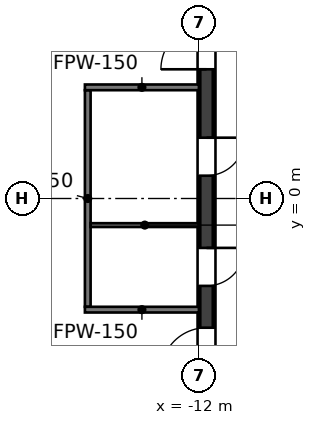
"""IFC4 building model, lengths in metres.
Left out: names, types, materials, properties, quantities, classifications, styles, units other than length and angle.
Written with IfcOpenShell. Run it as: python <this file> out.ifc"""

import sys

from ifc_helpers import new_model, si_unit, direction, frame, frame_2d, origin, place, context, subcontext, project, spatial, rectangle, extrude, element, fill, save


model = new_model("IFC4")
c1 = context("Model", 3, precision=1e-05, world=origin(), true_north=direction((0.0, 1.0)))
c2 = subcontext(c1, "Body", "Model", "MODEL_VIEW")
j1 = project(units=[si_unit("LENGTHUNIT", "METRE"), si_unit("PLANEANGLEUNIT", "RADIAN")], contexts=[c1])
p1 = place(None, origin())
s1 = spatial("IfcSite", under=j1, at=p1, CompositionType="ELEMENT")
p2 = place(p1, origin())
s2 = spatial("IfcBuilding", under=s1, at=p2, CompositionType="ELEMENT")
p3 = place(p2, frame((0.0, 0.0, 225.6)))
s3 = spatial("IfcBuildingStorey", under=s2, at=p3, CompositionType="ELEMENT", Elevation=225.6)
p4 = place(p3, frame((-11.8, -5.5, 0.0), z_axis=(0.0, 0.0, 1.0), x_axis=(0.0, 1.0, 0.0)))
e1 = element("IfcWall", 1, at=p4, inside=s3, PredefinedType="SHEAR", context=c2, shape_type="SweptSolid", body=[
    extrude(rectangle(XDim=11.0, YDim=0.4, at=frame_2d((5.5, 0.0))), origin(), (0.0, 0.0, 1.0), 4.0),
])
p5 = place(p4, frame((3.2, 0.0, 0.0)))
e2 = element("IfcOpeningElement", 2, at=p5, cuts=e1, PredefinedType="OPENING", context=c2, shape_type="SweptSolid", body=[
    extrude(rectangle(XDim=1.0, YDim=2.1, at=frame_2d((0.5, 1.05))), frame((0.0, 0.2, 0.0), z_axis=(0.0, -1.0, 0.0), x_axis=(1.0, 0.0, 0.0)), (0.0, 0.0, 1.0), 0.4),
])
p6 = place(p4, frame((6.1, 0.0, 0.0)))
e3 = element("IfcOpeningElement", 3, at=p6, cuts=e1, PredefinedType="OPENING", context=c2, shape_type="SweptSolid", body=[
    extrude(rectangle(XDim=1.0, YDim=2.1, at=frame_2d((0.5, 1.05))), frame((0.0, 0.2, 0.0), z_axis=(0.0, -1.0, 0.0), x_axis=(1.0, 0.0, 0.0)), (0.0, 0.0, 1.0), 0.4),
])
p7 = place(p4, frame((0.9, 0.0, 0.0)))
e4 = element("IfcOpeningElement", 4, at=p7, cuts=e1, PredefinedType="OPENING", context=c2, shape_type="SweptSolid", body=[
    extrude(rectangle(XDim=1.2, YDim=2.1, at=frame_2d((0.6, 1.05))), frame((0.0, 0.2, 0.0), z_axis=(0.0, -1.0, 0.0), x_axis=(1.0, 0.0, 0.0)), (0.0, 0.0, 1.0), 0.4),
])
p8 = place(p4, frame((8.9, 0.0, 0.0)))
e5 = element("IfcOpeningElement", 5, at=p8, cuts=e1, PredefinedType="OPENING", context=c2, shape_type="SweptSolid", body=[
    extrude(rectangle(XDim=1.2, YDim=2.1, at=frame_2d((0.6, 1.05))), frame((0.0, 0.2, 0.0), z_axis=(0.0, -1.0, 0.0), x_axis=(1.0, 0.0, 0.0)), (0.0, 0.0, 1.0), 0.4),
])
p9 = place(p3, frame((-14.925, -2.85, 0.0), z_axis=(0.0, 0.0, 1.0), x_axis=(0.0, 1.0, 0.0)))
e6 = element("IfcWall", 6, at=p9, inside=s3, PredefinedType="PARTITIONING", context=c2, shape_type="SweptSolid", body=[
    extrude(rectangle(XDim=5.7, YDim=0.15, at=frame_2d((2.85, 0.0))), origin(), (0.0, 0.0, 1.0), 2.918),
])
for number, where, z_axis, x_axis in (
    (7, (-15.0, 2.925, 0.0), (0.0, 0.0, 1.0), (1.0, 0.0, 0.0)),
    (8, (-15.0, -2.925, 0.0), (0.0, 0.0, 1.0), (1.0, 0.0, 0.0)),
):
    element("IfcWall", number, at=place(p3, frame(where, z_axis=z_axis, x_axis=x_axis)), inside=s3, PredefinedType="PARTITIONING", context=c2, shape_type="SweptSolid", body=[
        extrude(rectangle(XDim=3.0, YDim=0.15, at=frame_2d((1.5, 0.0))), origin(), (0.0, 0.0, 1.0), 2.918),
    ])
p10 = place(p3, frame((-14.85, -0.7, 0.0), z_axis=(0.0, 0.0, 1.0), x_axis=(1.0, 0.0, 0.0)))
e9 = element("IfcWall", 9, at=p10, inside=s3, PredefinedType="PARTITIONING", context=c2, shape_type="SweptSolid", body=[
    extrude(rectangle(XDim=2.85, YDim=0.1, at=frame_2d((1.425, 0.0))), origin(), (0.0, 0.0, 1.0), 2.918),
])
p11 = place(p5, origin())
e10 = element("IfcDoor", 10, at=p11, inside=s3, OperationType="SINGLE_SWING_RIGHT", PredefinedType="DOOR", context=c2, shape_type="SweptSolid", body=[
    extrude(rectangle(XDim=1.0, YDim=2.1, at=frame_2d((0.5, 1.05))), frame((0.0, 0.025, 0.0), z_axis=(0.0, -1.0, 0.0), x_axis=(1.0, 0.0, 0.0)), (0.0, 0.0, 1.0), 0.05),
])
fill(e2, e10)
p12 = place(p6, origin())
e11 = element("IfcDoor", 11, at=p12, inside=s3, OperationType="SINGLE_SWING_RIGHT", PredefinedType="DOOR", context=c2, shape_type="SweptSolid", body=[
    extrude(rectangle(XDim=1.0, YDim=2.1, at=frame_2d((0.5, 1.05))), frame((0.0, 0.025, 0.0), z_axis=(0.0, -1.0, 0.0), x_axis=(1.0, 0.0, 0.0)), (0.0, 0.0, 1.0), 0.05),
])
fill(e3, e11)
p13 = place(p7, origin())
e12 = element("IfcDoor", 12, at=p13, inside=s3, OperationType="SINGLE_SWING_LEFT", PredefinedType="DOOR", context=c2, shape_type="SweptSolid", body=[
    extrude(rectangle(XDim=1.2, YDim=2.1, at=frame_2d((0.6, 1.05))), frame((0.0, 0.025, 0.0), z_axis=(0.0, -1.0, 0.0), x_axis=(1.0, 0.0, 0.0)), (0.0, 0.0, 1.0), 0.05),
])
fill(e4, e12)
p14 = place(p8, origin())
e13 = element("IfcDoor", 13, at=p14, inside=s3, OperationType="SINGLE_SWING_LEFT", PredefinedType="DOOR", context=c2, shape_type="SweptSolid", body=[
    extrude(rectangle(XDim=1.2, YDim=2.1, at=frame_2d((0.6, 1.05))), frame((0.0, 0.025, 0.0), z_axis=(0.0, -1.0, 0.0), x_axis=(1.0, 0.0, 0.0)), (0.0, 0.0, 1.0), 0.05),
])
fill(e5, e13)
save(model, sys.argv[1])
